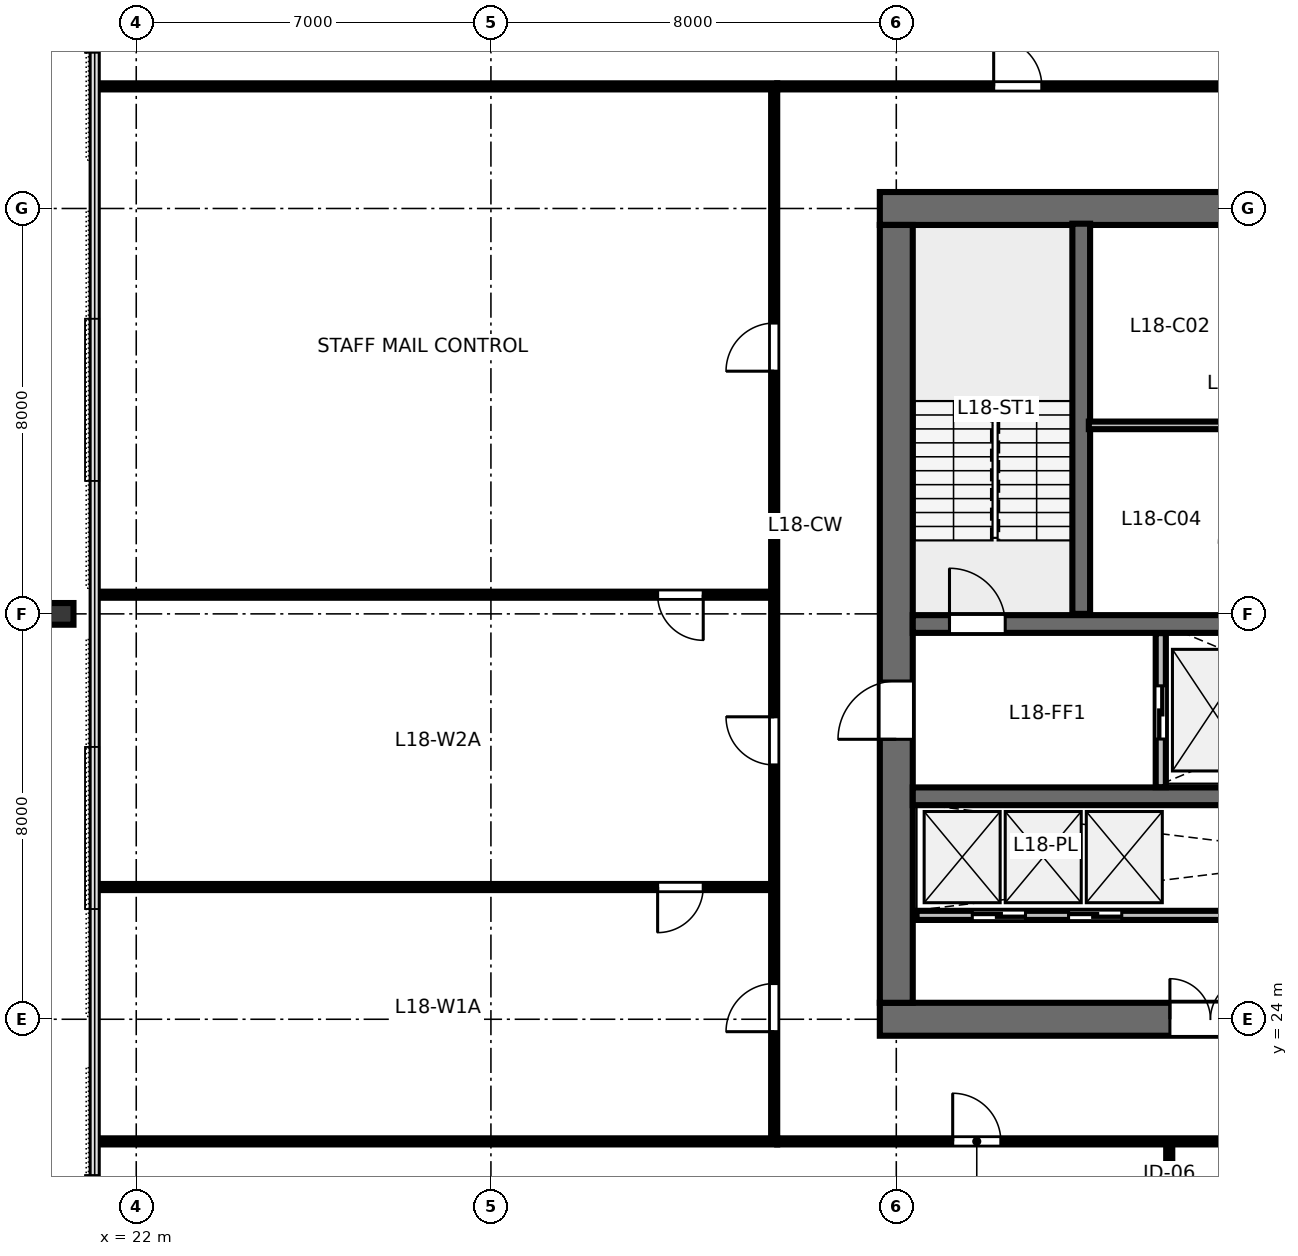
"""IFC4 building model, lengths in metres.
Left out: names, types, materials, properties, quantities, classifications, styles, units other than length and angle.
Written with IfcOpenShell. Run it as: python <this file> out.ifc"""

import sys

from ifc_helpers import new_model, si_unit, direction, frame, frame_2d, origin, origin_2d, place, context, subcontext, project, spatial, rectangle, i_section, extrude, element, fill, save


model = new_model("IFC4")
c1 = context("Model", 3, precision=1e-05, world=origin(), true_north=direction((0.0, 1.0)))
c2 = subcontext(c1, "Body", "Model", "MODEL_VIEW")
j1 = project(units=[si_unit("LENGTHUNIT", "METRE"), si_unit("PLANEANGLEUNIT", "RADIAN")], contexts=[c1])
p1 = place(None, origin())
s1 = spatial("IfcSite", under=j1, at=p1, CompositionType="ELEMENT")
p2 = place(p1, origin())
s2 = spatial("IfcBuilding", under=s1, at=p2, CompositionType="ELEMENT")
p3 = place(p2, frame((0.0, 0.0, 71.2)))
s3 = spatial("IfcBuildingStorey", under=s2, at=p3, CompositionType="ELEMENT", Elevation=71.2)
p4 = place(p3, frame((36.675, 24.0, 0.0), z_axis=(0.0, 0.0, 1.0), x_axis=(1.0, 0.0, 0.0)))
e1 = element("IfcWall", 1, at=p4, inside=s3, PredefinedType="SHEAR", context=c2, shape_type="SweptSolid", body=[
    extrude(rectangle(XDim=18.65, YDim=0.65, at=frame_2d((9.325, 0.0))), origin(), (0.0, 0.0, 1.0), 3.36),
])
p5 = place(p4, frame((5.725, 0.0, 0.0)))
e2 = element("IfcOpeningElement", 2, at=p5, cuts=e1, PredefinedType="OPENING", context=c2, shape_type="SweptSolid", body=[
    extrude(rectangle(XDim=1.6, YDim=2.15, at=frame_2d((0.8, 1.075))), frame((0.0, 0.335, 0.0), z_axis=(0.0, -1.0, 0.0), x_axis=(1.0, 0.0, 0.0)), (0.0, 0.0, 1.0), 0.67),
])
p6 = place(p4, frame((12.125, 0.0, 0.0)))
e3 = element("IfcOpeningElement", 3, at=p6, cuts=e1, PredefinedType="OPENING", context=c2, shape_type="SweptSolid", body=[
    extrude(rectangle(XDim=1.6, YDim=2.15, at=frame_2d((0.8, 1.075))), frame((0.0, 0.335, 0.0), z_axis=(0.0, -1.0, 0.0), x_axis=(1.0, 0.0, 0.0)), (0.0, 0.0, 1.0), 0.67),
])
p7 = place(p3, frame((36.675, 40.0, 0.0), z_axis=(0.0, 0.0, 1.0), x_axis=(1.0, 0.0, 0.0)))
e4 = element("IfcWall", 4, at=p7, inside=s3, PredefinedType="SHEAR", context=c2, shape_type="SweptSolid", body=[
    extrude(rectangle(XDim=18.65, YDim=0.65, at=frame_2d((9.325, 0.0))), origin(), (0.0, 0.0, 1.0), 3.36),
])
p8 = place(p7, frame((8.825, 0.0, 0.0)))
e5 = element("IfcOpeningElement", 5, at=p8, cuts=e4, PredefinedType="OPENING", context=c2, shape_type="SweptSolid", body=[
    extrude(rectangle(XDim=1.0, YDim=2.15, at=frame_2d((0.5, 1.075))), frame((0.0, 0.335, 0.0), z_axis=(0.0, -1.0, 0.0), x_axis=(1.0, 0.0, 0.0)), (0.0, 0.0, 1.0), 0.67),
])
p9 = place(p3, frame((37.0, 24.325, 0.0), z_axis=(0.0, 0.0, 1.0), x_axis=(0.0, 1.0, 0.0)))
e6 = element("IfcWall", 6, at=p9, inside=s3, PredefinedType="SHEAR", context=c2, shape_type="SweptSolid", body=[
    extrude(rectangle(XDim=15.35, YDim=0.65, at=frame_2d((7.675, 0.0))), origin(), (0.0, 0.0, 1.0), 3.36),
])
p10 = place(p9, frame((5.2, 0.0, 0.0)))
e7 = element("IfcOpeningElement", 7, at=p10, cuts=e6, PredefinedType="OPENING", context=c2, shape_type="SweptSolid", body=[
    extrude(rectangle(XDim=1.15, YDim=2.15, at=frame_2d((0.575, 1.075))), frame((0.0, 0.335, 0.0), z_axis=(0.0, -1.0, 0.0), x_axis=(1.0, 0.0, 0.0)), (0.0, 0.0, 1.0), 0.67),
])
p11 = place(p3, frame((37.325, 31.8, 0.0), z_axis=(0.0, 0.0, 1.0), x_axis=(1.0, 0.0, 0.0)))
e8 = element("IfcWall", 8, at=p11, inside=s3, PredefinedType="SHEAR", context=c2, shape_type="SweptSolid", body=[
    extrude(rectangle(XDim=17.35, YDim=0.35, at=frame_2d((8.675, 0.0))), origin(), (0.0, 0.0, 1.0), 3.36),
])
p12 = place(p11, frame((0.725, 0.0, 0.0)))
e9 = element("IfcOpeningElement", 9, at=p12, cuts=e8, PredefinedType="OPENING", context=c2, shape_type="SweptSolid", body=[
    extrude(rectangle(XDim=1.1, YDim=2.15, at=frame_2d((0.55, 1.075))), frame((0.0, 0.185, 0.0), z_axis=(0.0, -1.0, 0.0), x_axis=(1.0, 0.0, 0.0)), (0.0, 0.0, 1.0), 0.37),
])
p13 = place(p11, frame((14.625, 0.0, 0.0)))
e10 = element("IfcOpeningElement", 10, at=p13, cuts=e8, PredefinedType="OPENING", context=c2, shape_type="SweptSolid", body=[
    extrude(rectangle(XDim=1.1, YDim=2.15, at=frame_2d((0.55, 1.075))), frame((0.0, 0.185, 0.0), z_axis=(0.0, -1.0, 0.0), x_axis=(1.0, 0.0, 0.0)), (0.0, 0.0, 1.0), 0.37),
])
p14 = place(p3, frame((37.325, 28.4, 0.0), z_axis=(0.0, 0.0, 1.0), x_axis=(1.0, 0.0, 0.0)))
e11 = element("IfcWall", 11, at=p14, inside=s3, PredefinedType="SHEAR", context=c2, shape_type="SweptSolid", body=[
    extrude(rectangle(XDim=17.35, YDim=0.35, at=frame_2d((8.675, 0.0))), origin(), (0.0, 0.0, 1.0), 3.36),
])
p15 = place(p3, frame((20.52, 32.0, 0.0), z_axis=(0.0, 0.0, 1.0), x_axis=(0.0, 1.0, 0.0)))
e12 = element("IfcColumn", 12, at=p15, inside=s3, PredefinedType="COLUMN", context=c2, shape_type="SweptSolid", body=[
    extrude(i_section(OverallWidth=0.428, OverallDepth=0.483, WebThickness=0.051, FlangeThickness=0.082, FilletRadius=0.025, at=origin_2d()), origin(), (0.0, 0.0, 1.0), 3.358),
])
p16 = place(p3, frame((40.65, 32.0, 0.0), z_axis=(0.0, 0.0, 1.0), x_axis=(0.0, 1.0, 0.0)))
e13 = element("IfcWall", 13, at=p16, inside=s3, PredefinedType="SHEAR", context=c2, shape_type="SweptSolid", body=[
    extrude(rectangle(XDim=7.7, YDim=0.35, at=frame_2d((3.85, 0.0))), origin(), (0.0, 0.0, 1.0), 3.6),
])
p17 = place(p3, frame((40.8, 35.72, 0.0), z_axis=(0.0, 0.0, 1.0), x_axis=(1.0, 0.0, 0.0)))
e14 = element("IfcWall", 14, at=p17, inside=s3, PredefinedType="PARTITIONING", context=c2, shape_type="SweptSolid", body=[
    extrude(rectangle(XDim=10.4, YDim=0.15, at=frame_2d((5.2, 0.0))), origin(), (0.0, 0.0, 1.0), 3.36),
])
p18 = place(p17, frame((4.9, 0.0, 0.0)))
e15 = element("IfcOpeningElement", 15, at=p18, cuts=e14, PredefinedType="OPENING", context=c2, shape_type="SweptSolid", body=[
    extrude(rectangle(XDim=0.9, YDim=2.15, at=frame_2d((0.45, 1.075))), frame((0.0, 0.085, 0.0), z_axis=(0.0, -1.0, 0.0), x_axis=(1.0, 0.0, 0.0)), (0.0, 0.0, 1.0), 0.17),
])
p19 = place(p3, frame((42.22, 28.58, 0.0), z_axis=(0.0, 0.0, 1.0), x_axis=(0.0, 1.0, 0.0)))
e16 = element("IfcWall", 16, at=p19, inside=s3, PredefinedType="PARTITIONING", context=c2, shape_type="SweptSolid", body=[
    extrude(rectangle(XDim=3.04, YDim=0.2, at=frame_2d((1.52, 0.0))), origin(), (0.0, 0.0, 1.0), 3.36),
])
p20 = place(p19, frame((0.95, 0.0, 0.0)))
e17 = element("IfcOpeningElement", 17, at=p20, cuts=e16, PredefinedType="OPENING", context=c2, shape_type="SweptSolid", body=[
    extrude(rectangle(XDim=1.05, YDim=2.15, at=frame_2d((0.525, 1.075))), frame((0.0, 0.11, 0.0), z_axis=(0.0, -1.0, 0.0), x_axis=(1.0, 0.0, 0.0)), (0.0, 0.0, 1.0), 0.22),
])
p21 = place(p3, frame((37.4, 26.05, 0.0), z_axis=(0.0, 0.0, 1.0), x_axis=(1.0, 0.0, 0.0)))
e18 = element("IfcWall", 18, at=p21, inside=s3, PredefinedType="PARTITIONING", context=c2, shape_type="SweptSolid", body=[
    extrude(rectangle(XDim=17.2, YDim=0.18, at=frame_2d((8.6, 0.0))), origin(), (0.0, 0.0, 1.0), 3.36),
])
p22 = place(p21, frame((1.1, 0.0, 0.0)))
e19 = element("IfcOpeningElement", 19, at=p22, cuts=e18, PredefinedType="OPENING", context=c2, shape_type="SweptSolid", body=[
    extrude(rectangle(XDim=1.05, YDim=2.15, at=frame_2d((0.525, 1.075))), frame((0.0, 0.1, 0.0), z_axis=(0.0, -1.0, 0.0), x_axis=(1.0, 0.0, 0.0)), (0.0, 0.0, 1.0), 0.2),
])
p23 = place(p21, frame((3.0, 0.0, 0.0)))
e20 = element("IfcOpeningElement", 20, at=p23, cuts=e18, PredefinedType="OPENING", context=c2, shape_type="SweptSolid", body=[
    extrude(rectangle(XDim=1.05, YDim=2.15, at=frame_2d((0.525, 1.075))), frame((0.0, 0.1, 0.0), z_axis=(0.0, -1.0, 0.0), x_axis=(1.0, 0.0, 0.0)), (0.0, 0.0, 1.0), 0.2),
])
p24 = place(p3, frame((42.387, 21.59, 0.0), z_axis=(0.0, 0.0, 1.0), x_axis=(0.0, -1.0, 0.0)))
e21 = element("IfcWall", 21, at=p24, inside=s3, PredefinedType="PARTITIONING", context=c2, shape_type="SweptSolid", body=[
    extrude(rectangle(XDim=11.41, YDim=0.12, at=frame_2d((5.705, 0.0))), origin(), (0.0, 0.0, 1.0), 2.64),
])
p25 = place(p24, frame((1.4, 0.0, 0.0)))
e22 = element("IfcOpeningElement", 22, at=p25, cuts=e21, PredefinedType="OPENING", context=c2, shape_type="SweptSolid", body=[
    extrude(rectangle(XDim=0.9, YDim=2.15, at=frame_2d((0.45, 1.075))), frame((0.0, 0.07, 0.0), z_axis=(0.0, -1.0, 0.0), x_axis=(1.0, 0.0, 0.0)), (0.0, 0.0, 1.0), 0.14),
])
p26 = place(p3, frame((34.65, 21.59, 0.0), z_axis=(0.0, 0.0, 1.0), x_axis=(1.0, 0.0, 0.0)))
e23 = element("IfcWall", 23, at=p26, inside=s3, PredefinedType="PARTITIONING", context=c2, shape_type="SweptSolid", body=[
    extrude(rectangle(XDim=22.7, YDim=0.12, at=frame_2d((11.35, 0.0))), origin(), (0.0, 0.0, 1.0), 2.64),
])
p27 = place(p26, frame((3.463, 0.0, 0.0)))
e24 = element("IfcOpeningElement", 24, at=p27, cuts=e23, PredefinedType="OPENING", context=c2, shape_type="SweptSolid", body=[
    extrude(rectangle(XDim=0.95, YDim=2.15, at=frame_2d((0.475, 1.075))), frame((0.0, 0.07, 0.0), z_axis=(0.0, -1.0, 0.0), x_axis=(1.0, 0.0, 0.0)), (0.0, 0.0, 1.0), 0.14),
])
p28 = place(p26, frame((14.673, 0.0, 0.0)))
e25 = element("IfcOpeningElement", 25, at=p28, cuts=e23, PredefinedType="OPENING", context=c2, shape_type="SweptSolid", body=[
    extrude(rectangle(XDim=0.95, YDim=2.15, at=frame_2d((0.475, 1.075))), frame((0.0, 0.07, 0.0), z_axis=(0.0, -1.0, 0.0), x_axis=(1.0, 0.0, 0.0)), (0.0, 0.0, 1.0), 0.14),
])
p29 = place(p3, frame((34.65, 42.41, 0.0), z_axis=(0.0, 0.0, 1.0), x_axis=(1.0, 0.0, 0.0)))
e26 = element("IfcWall", 26, at=p29, inside=s3, PredefinedType="PARTITIONING", context=c2, shape_type="SweptSolid", body=[
    extrude(rectangle(XDim=22.7, YDim=0.12, at=frame_2d((11.35, 0.0))), origin(), (0.0, 0.0, 1.0), 2.64),
])
p30 = place(p29, frame((4.272, 0.0, 0.0)))
e27 = element("IfcOpeningElement", 27, at=p30, cuts=e26, PredefinedType="OPENING", context=c2, shape_type="SweptSolid", body=[
    extrude(rectangle(XDim=0.95, YDim=2.15, at=frame_2d((0.475, 1.075))), frame((0.0, 0.07, 0.0), z_axis=(0.0, -1.0, 0.0), x_axis=(1.0, 0.0, 0.0)), (0.0, 0.0, 1.0), 0.14),
])
p31 = place(p29, frame((11.432, 0.0, 0.0)))
e28 = element("IfcOpeningElement", 28, at=p31, cuts=e26, PredefinedType="OPENING", context=c2, shape_type="SweptSolid", body=[
    extrude(rectangle(XDim=0.95, YDim=2.15, at=frame_2d((0.475, 1.075))), frame((0.0, 0.07, 0.0), z_axis=(0.0, -1.0, 0.0), x_axis=(1.0, 0.0, 0.0)), (0.0, 0.0, 1.0), 0.14),
])
p32 = place(p29, frame((18.035, 0.0, 0.0)))
e29 = element("IfcOpeningElement", 29, at=p32, cuts=e26, PredefinedType="OPENING", context=c2, shape_type="SweptSolid", body=[
    extrude(rectangle(XDim=0.95, YDim=2.15, at=frame_2d((0.475, 1.075))), frame((0.0, 0.07, 0.0), z_axis=(0.0, -1.0, 0.0), x_axis=(1.0, 0.0, 0.0)), (0.0, 0.0, 1.0), 0.14),
])
p33 = place(p3, frame((34.59, 26.61, 0.0), z_axis=(0.0, 0.0, 1.0), x_axis=(-1.0, 0.0, 0.0)))
e30 = element("IfcWall", 30, at=p33, inside=s3, PredefinedType="PARTITIONING", context=c2, shape_type="SweptSolid", body=[
    extrude(rectangle(XDim=13.41, YDim=0.12, at=frame_2d((6.705, 0.0))), origin(), (0.0, 0.0, 1.0), 2.64),
])
p34 = place(p33, frame((1.4, 0.0, 0.0)))
e31 = element("IfcOpeningElement", 31, at=p34, cuts=e30, PredefinedType="OPENING", context=c2, shape_type="SweptSolid", body=[
    extrude(rectangle(XDim=0.9, YDim=2.15, at=frame_2d((0.45, 1.075))), frame((0.0, 0.07, 0.0), z_axis=(0.0, -1.0, 0.0), x_axis=(1.0, 0.0, 0.0)), (0.0, 0.0, 1.0), 0.14),
])
p35 = place(p3, frame((34.59, 32.378, 0.0), z_axis=(0.0, 0.0, 1.0), x_axis=(-1.0, 0.0, 0.0)))
e32 = element("IfcWall", 32, at=p35, inside=s3, PredefinedType="PARTITIONING", context=c2, shape_type="SweptSolid", body=[
    extrude(rectangle(XDim=13.41, YDim=0.12, at=frame_2d((6.705, 0.0))), origin(), (0.0, 0.0, 1.0), 2.64),
])
p36 = place(p35, frame((1.4, 0.0, 0.0)))
e33 = element("IfcOpeningElement", 33, at=p36, cuts=e32, PredefinedType="OPENING", context=c2, shape_type="SweptSolid", body=[
    extrude(rectangle(XDim=0.9, YDim=2.15, at=frame_2d((0.45, 1.075))), frame((0.0, 0.07, 0.0), z_axis=(0.0, -1.0, 0.0), x_axis=(1.0, 0.0, 0.0)), (0.0, 0.0, 1.0), 0.14),
])
p37 = place(p3, frame((34.59, 21.65, 0.0), z_axis=(0.0, 0.0, 1.0), x_axis=(0.0, 1.0, 0.0)))
e34 = element("IfcWall", 34, at=p37, inside=s3, PredefinedType="PARTITIONING", context=c2, shape_type="SweptSolid", body=[
    extrude(rectangle(XDim=20.7, YDim=0.12, at=frame_2d((10.35, 0.0))), origin(), (0.0, 0.0, 1.0), 2.64),
])
p38 = place(p37, frame((2.105, 0.0, 0.0)))
e35 = element("IfcOpeningElement", 35, at=p38, cuts=e34, PredefinedType="OPENING", context=c2, shape_type="SweptSolid", body=[
    extrude(rectangle(XDim=0.95, YDim=2.15, at=frame_2d((0.475, 1.075))), frame((0.0, 0.07, 0.0), z_axis=(0.0, -1.0, 0.0), x_axis=(1.0, 0.0, 0.0)), (0.0, 0.0, 1.0), 0.14),
])
p39 = place(p37, frame((7.369, 0.0, 0.0)))
e36 = element("IfcOpeningElement", 36, at=p39, cuts=e34, PredefinedType="OPENING", context=c2, shape_type="SweptSolid", body=[
    extrude(rectangle(XDim=0.95, YDim=2.15, at=frame_2d((0.475, 1.075))), frame((0.0, 0.07, 0.0), z_axis=(0.0, -1.0, 0.0), x_axis=(1.0, 0.0, 0.0)), (0.0, 0.0, 1.0), 0.14),
])
p40 = place(p37, frame((15.139, 0.0, 0.0)))
e37 = element("IfcOpeningElement", 37, at=p40, cuts=e34, PredefinedType="OPENING", context=c2, shape_type="SweptSolid", body=[
    extrude(rectangle(XDim=0.95, YDim=2.15, at=frame_2d((0.475, 1.075))), frame((0.0, 0.07, 0.0), z_axis=(0.0, -1.0, 0.0), x_axis=(1.0, 0.0, 0.0)), (0.0, 0.0, 1.0), 0.14),
])
for number, where, z_axis, x_axis in (
    (38, (34.65, 21.59, 0.0), (0.0, 0.0, 1.0), (-1.0, 0.0, 0.0)),
    (39, (34.65, 42.41, 0.0), (0.0, 0.0, 1.0), (-1.0, 0.0, 0.0)),
):
    element("IfcWall", number, at=place(p3, frame(where, z_axis=z_axis, x_axis=x_axis)), inside=s3, PredefinedType="PARTITIONING", context=c2, shape_type="SweptSolid", body=[
        extrude(rectangle(XDim=13.47, YDim=0.12, at=frame_2d((6.735, 0.0))), origin(), (0.0, 0.0, 1.0), 2.64),
    ])
p41 = place(p12, origin())
e40 = element("IfcDoor", 40, at=p41, inside=s3, OperationType="SINGLE_SWING_LEFT", PredefinedType="DOOR", context=c2, shape_type="SweptSolid", body=[
    extrude(rectangle(XDim=1.1, YDim=2.15, at=frame_2d((0.55, 1.075))), frame((0.0, 0.025, 0.0), z_axis=(0.0, -1.0, 0.0), x_axis=(1.0, 0.0, 0.0)), (0.0, 0.0, 1.0), 0.05),
])
fill(e9, e40)
p42 = place(p10, origin())
e41 = element("IfcDoor", 41, at=p42, inside=s3, OperationType="SINGLE_SWING_LEFT", PredefinedType="DOOR", context=c2, shape_type="SweptSolid", body=[
    extrude(rectangle(XDim=1.15, YDim=2.15, at=frame_2d((0.575, 1.075))), frame((0.0, 0.025, 0.0), z_axis=(0.0, -1.0, 0.0), x_axis=(1.0, 0.0, 0.0)), (0.0, 0.0, 1.0), 0.05),
])
fill(e7, e41)
p43 = place(p5, origin())
e42 = element("IfcDoor", 42, at=p43, inside=s3, OperationType="DOUBLE_DOOR_SINGLE_SWING", PredefinedType="DOOR", context=c2, shape_type="SweptSolid", body=[
    extrude(rectangle(XDim=1.6, YDim=2.15, at=frame_2d((0.8, 1.075))), frame((0.0, 0.025, 0.0), z_axis=(0.0, -1.0, 0.0), x_axis=(1.0, 0.0, 0.0)), (0.0, 0.0, 1.0), 0.05),
])
fill(e2, e42)
p44 = place(p20, origin())
e43 = element("IfcDoor", 43, at=p44, inside=s3, OperationType="SLIDING_TO_LEFT", PredefinedType="DOOR", context=c2, shape_type="SweptSolid", body=[
    extrude(rectangle(XDim=1.05, YDim=2.15, at=frame_2d((0.525, 1.075))), frame((0.0, 0.025, 0.0), z_axis=(0.0, -1.0, 0.0), x_axis=(1.0, 0.0, 0.0)), (0.0, 0.0, 1.0), 0.05),
])
fill(e17, e43)
p45 = place(p22, origin())
e44 = element("IfcDoor", 44, at=p45, inside=s3, OperationType="SLIDING_TO_LEFT", PredefinedType="DOOR", context=c2, shape_type="SweptSolid", body=[
    extrude(rectangle(XDim=1.05, YDim=2.15, at=frame_2d((0.525, 1.075))), frame((0.0, 0.025, 0.0), z_axis=(0.0, -1.0, 0.0), x_axis=(1.0, 0.0, 0.0)), (0.0, 0.0, 1.0), 0.05),
])
fill(e19, e44)
p46 = place(p23, origin())
e45 = element("IfcDoor", 45, at=p46, inside=s3, OperationType="SLIDING_TO_RIGHT", PredefinedType="DOOR", context=c2, shape_type="SweptSolid", body=[
    extrude(rectangle(XDim=1.05, YDim=2.15, at=frame_2d((0.525, 1.075))), frame((0.0, 0.025, 0.0), z_axis=(0.0, -1.0, 0.0), x_axis=(1.0, 0.0, 0.0)), (0.0, 0.0, 1.0), 0.05),
])
fill(e20, e45)
p47 = place(p27, origin())
e46 = element("IfcDoor", 46, at=p47, inside=s3, OperationType="SINGLE_SWING_LEFT", PredefinedType="DOOR", context=c2, shape_type="SweptSolid", body=[
    extrude(rectangle(XDim=0.95, YDim=2.15, at=frame_2d((0.475, 1.075))), frame((0.0, 0.025, 0.0), z_axis=(0.0, -1.0, 0.0), x_axis=(1.0, 0.0, 0.0)), (0.0, 0.0, 1.0), 0.05),
])
fill(e24, e46)
p48 = place(p30, origin())
e47 = element("IfcDoor", 47, at=p48, inside=s3, OperationType="SINGLE_SWING_LEFT", PredefinedType="DOOR", context=c2, shape_type="SweptSolid", body=[
    extrude(rectangle(XDim=0.95, YDim=2.15, at=frame_2d((0.475, 1.075))), frame((0.0, 0.025, 0.0), z_axis=(0.0, -1.0, 0.0), x_axis=(1.0, 0.0, 0.0)), (0.0, 0.0, 1.0), 0.05),
])
fill(e27, e47)
p49 = place(p34, origin())
e48 = element("IfcDoor", 48, at=p49, inside=s3, OperationType="SINGLE_SWING_RIGHT", PredefinedType="DOOR", context=c2, shape_type="SweptSolid", body=[
    extrude(rectangle(XDim=0.9, YDim=2.15, at=frame_2d((0.45, 1.075))), frame((0.0, 0.025, 0.0), z_axis=(0.0, -1.0, 0.0), x_axis=(1.0, 0.0, 0.0)), (0.0, 0.0, 1.0), 0.05),
])
fill(e31, e48)
p50 = place(p36, origin())
e49 = element("IfcDoor", 49, at=p50, inside=s3, OperationType="SINGLE_SWING_LEFT", PredefinedType="DOOR", context=c2, shape_type="SweptSolid", body=[
    extrude(rectangle(XDim=0.9, YDim=2.15, at=frame_2d((0.45, 1.075))), frame((0.0, 0.025, 0.0), z_axis=(0.0, -1.0, 0.0), x_axis=(1.0, 0.0, 0.0)), (0.0, 0.0, 1.0), 0.05),
])
fill(e33, e49)
p51 = place(p38, origin())
e50 = element("IfcDoor", 50, at=p51, inside=s3, OperationType="SINGLE_SWING_LEFT", PredefinedType="DOOR", context=c2, shape_type="SweptSolid", body=[
    extrude(rectangle(XDim=0.95, YDim=2.15, at=frame_2d((0.475, 1.075))), frame((0.0, 0.025, 0.0), z_axis=(0.0, -1.0, 0.0), x_axis=(1.0, 0.0, 0.0)), (0.0, 0.0, 1.0), 0.05),
])
fill(e35, e50)
p52 = place(p39, origin())
e51 = element("IfcDoor", 51, at=p52, inside=s3, OperationType="SINGLE_SWING_RIGHT", PredefinedType="DOOR", context=c2, shape_type="SweptSolid", body=[
    extrude(rectangle(XDim=0.95, YDim=2.15, at=frame_2d((0.475, 1.075))), frame((0.0, 0.025, 0.0), z_axis=(0.0, -1.0, 0.0), x_axis=(1.0, 0.0, 0.0)), (0.0, 0.0, 1.0), 0.05),
])
fill(e36, e51)
p53 = place(p40, origin())
e52 = element("IfcDoor", 52, at=p53, inside=s3, OperationType="SINGLE_SWING_LEFT", PredefinedType="DOOR", context=c2, shape_type="SweptSolid", body=[
    extrude(rectangle(XDim=0.95, YDim=2.15, at=frame_2d((0.475, 1.075))), frame((0.0, 0.025, 0.0), z_axis=(0.0, -1.0, 0.0), x_axis=(1.0, 0.0, 0.0)), (0.0, 0.0, 1.0), 0.05),
])
fill(e37, e52)
save(model, sys.argv[1])
